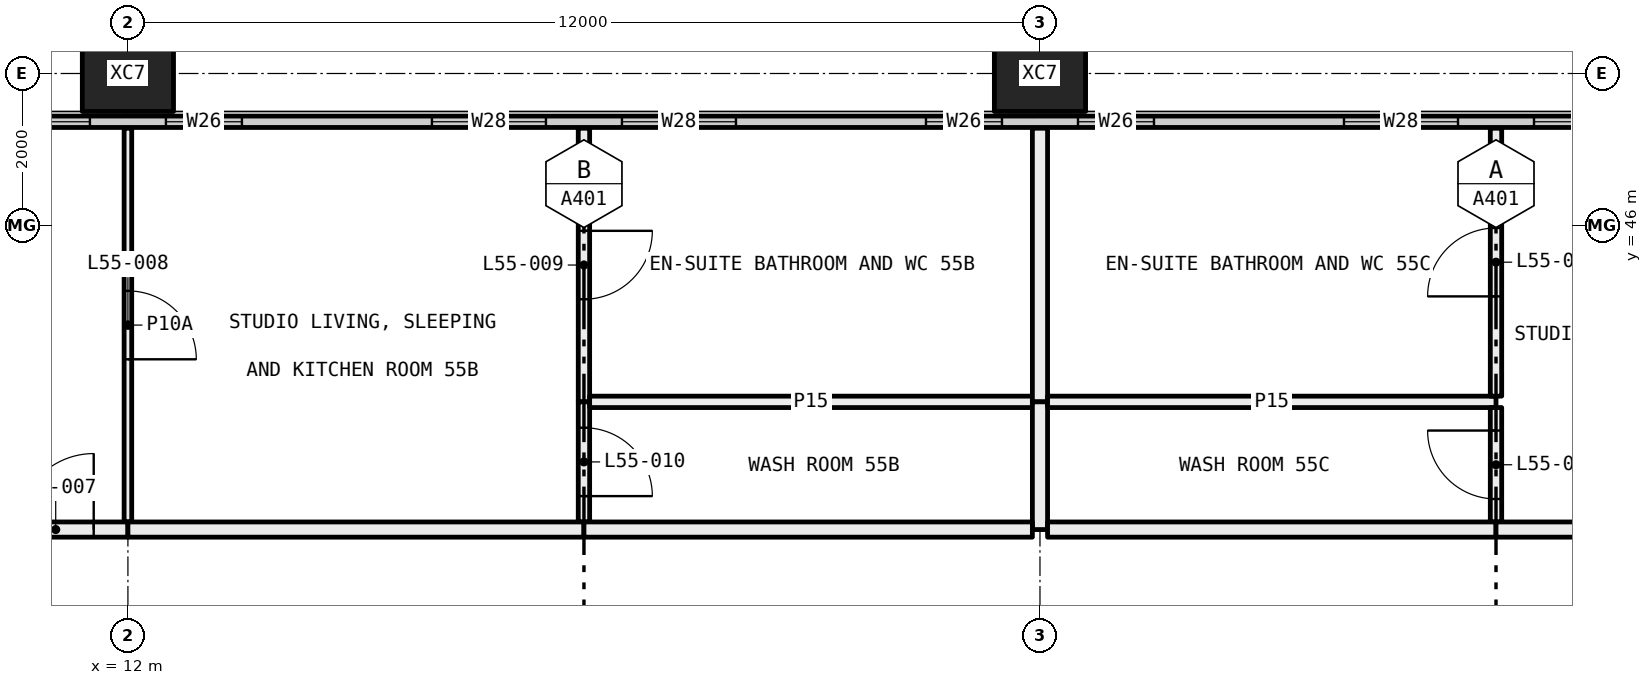
"""IFC4 building model, lengths in metres.
Left out: names, types, materials, properties, quantities, classifications, styles, units other than length and angle.
Written with IfcOpenShell. Run it as: python <this file> out.ifc"""

import sys

from ifc_helpers import new_model, si_unit, direction, frame, frame_2d, origin, origin_2d, place, context, subcontext, project, spatial, rectangle, hollow_rectangle, extrude, element, fill, save


model = new_model("IFC4")
c1 = context("Model", 3, precision=1e-05, world=origin(), true_north=direction((0.0, 1.0)))
c2 = subcontext(c1, "Body", "Model", "MODEL_VIEW")
j1 = project(units=[si_unit("LENGTHUNIT", "METRE"), si_unit("PLANEANGLEUNIT", "RADIAN")], contexts=[c1])
p1 = place(None, origin())
s1 = spatial("IfcSite", under=j1, at=p1, CompositionType="ELEMENT")
p2 = place(p1, origin())
s2 = spatial("IfcBuilding", under=s1, at=p2, CompositionType="ELEMENT")
p3 = place(p2, frame((0.0, 0.0, 206.55)))
s3 = spatial("IfcBuildingStorey", under=s2, at=p3, CompositionType="ELEMENT", Elevation=206.55)
for number, where, z_axis, x_axis in (
    (1, (12.0, 48.0, -0.4), (0.0, 0.0, 1.0), (1.0, 0.0, 0.0)),
    (2, (24.0, 48.0, -0.4), (0.0, 0.0, 1.0), (1.0, 0.0, 0.0)),
):
    element("IfcColumn", number, at=place(p3, frame(where, z_axis=z_axis, x_axis=x_axis)), inside=s3, PredefinedType="COLUMN", context=c2, shape_type="SweptSolid", body=[
        extrude(hollow_rectangle(XDim=1.2, YDim=1.0, WallThickness=0.045, at=origin_2d()), origin(), (0.0, 0.0, 1.0), 3.45),
    ])
p4 = place(p3, frame((6.56, 47.365, 0.0), z_axis=(0.0, 0.0, 1.0), x_axis=(1.0, 0.0, 0.0)))
e3 = element("IfcWall", 3, at=p4, inside=s3, PredefinedType="ELEMENTEDWALL", context=c2, shape_type="SweptSolid", body=[
    extrude(rectangle(XDim=46.88, YDim=0.15, at=frame_2d((23.44, 0.0))), origin(), (0.0, 0.0, 1.0), 3.05),
])
p5 = place(p4, frame((0.44, 0.0, 0.45)))
e4 = element("IfcOpeningElement", 4, at=p5, cuts=e3, PredefinedType="OPENING", context=c2, shape_type="SweptSolid", body=[
    extrude(rectangle(XDim=4.5, YDim=2.55, at=frame_2d((2.25, 1.275))), frame((0.0, 0.085, 0.0), z_axis=(0.0, -1.0, 0.0), x_axis=(1.0, 0.0, 0.0)), (0.0, 0.0, 1.0), 0.17),
])
p6 = place(p4, frame((5.94, 0.0, 0.45)))
e5 = element("IfcOpeningElement", 5, at=p6, cuts=e3, PredefinedType="OPENING", context=c2, shape_type="SweptSolid", body=[
    extrude(rectangle(XDim=1.0, YDim=2.55, at=frame_2d((0.5, 1.275))), frame((0.0, 0.085, 0.0), z_axis=(0.0, -1.0, 0.0), x_axis=(1.0, 0.0, 0.0)), (0.0, 0.0, 1.0), 0.17),
])
p7 = place(p4, frame((9.44, 0.0, 0.45)))
e6 = element("IfcOpeningElement", 6, at=p7, cuts=e3, PredefinedType="OPENING", context=c2, shape_type="SweptSolid", body=[
    extrude(rectangle(XDim=1.5, YDim=2.55, at=frame_2d((0.75, 1.275))), frame((0.0, 0.085, 0.0), z_axis=(0.0, -1.0, 0.0), x_axis=(1.0, 0.0, 0.0)), (0.0, 0.0, 1.0), 0.17),
])
p8 = place(p4, frame((11.94, 0.0, 0.45)))
e7 = element("IfcOpeningElement", 7, at=p8, cuts=e3, PredefinedType="OPENING", context=c2, shape_type="SweptSolid", body=[
    extrude(rectangle(XDim=1.5, YDim=2.55, at=frame_2d((0.75, 1.275))), frame((0.0, 0.085, 0.0), z_axis=(0.0, -1.0, 0.0), x_axis=(1.0, 0.0, 0.0)), (0.0, 0.0, 1.0), 0.17),
])
p9 = place(p4, frame((15.94, 0.0, 0.45)))
e8 = element("IfcOpeningElement", 8, at=p9, cuts=e3, PredefinedType="OPENING", context=c2, shape_type="SweptSolid", body=[
    extrude(rectangle(XDim=1.0, YDim=2.55, at=frame_2d((0.5, 1.275))), frame((0.0, 0.085, 0.0), z_axis=(0.0, -1.0, 0.0), x_axis=(1.0, 0.0, 0.0)), (0.0, 0.0, 1.0), 0.17),
])
p10 = place(p4, frame((17.94, 0.0, 0.45)))
e9 = element("IfcOpeningElement", 9, at=p10, cuts=e3, PredefinedType="OPENING", context=c2, shape_type="SweptSolid", body=[
    extrude(rectangle(XDim=1.0, YDim=2.55, at=frame_2d((0.5, 1.275))), frame((0.0, 0.085, 0.0), z_axis=(0.0, -1.0, 0.0), x_axis=(1.0, 0.0, 0.0)), (0.0, 0.0, 1.0), 0.17),
])
p11 = place(p4, frame((21.44, 0.0, 0.45)))
e10 = element("IfcOpeningElement", 10, at=p11, cuts=e3, PredefinedType="OPENING", context=c2, shape_type="SweptSolid", body=[
    extrude(rectangle(XDim=1.5, YDim=2.55, at=frame_2d((0.75, 1.275))), frame((0.0, 0.085, 0.0), z_axis=(0.0, -1.0, 0.0), x_axis=(1.0, 0.0, 0.0)), (0.0, 0.0, 1.0), 0.17),
])
p12 = place(p4, frame((23.94, 0.0, 0.45)))
e11 = element("IfcOpeningElement", 11, at=p12, cuts=e3, PredefinedType="OPENING", context=c2, shape_type="SweptSolid", body=[
    extrude(rectangle(XDim=1.5, YDim=2.55, at=frame_2d((0.75, 1.275))), frame((0.0, 0.085, 0.0), z_axis=(0.0, -1.0, 0.0), x_axis=(1.0, 0.0, 0.0)), (0.0, 0.0, 1.0), 0.17),
])
p13 = place(p4, frame((27.94, 0.0, 0.45)))
e12 = element("IfcOpeningElement", 12, at=p13, cuts=e3, PredefinedType="OPENING", context=c2, shape_type="SweptSolid", body=[
    extrude(rectangle(XDim=1.0, YDim=2.55, at=frame_2d((0.5, 1.275))), frame((0.0, 0.085, 0.0), z_axis=(0.0, -1.0, 0.0), x_axis=(1.0, 0.0, 0.0)), (0.0, 0.0, 1.0), 0.17),
])
p14 = place(p4, frame((29.94, 0.0, 0.45)))
e13 = element("IfcOpeningElement", 13, at=p14, cuts=e3, PredefinedType="OPENING", context=c2, shape_type="SweptSolid", body=[
    extrude(rectangle(XDim=1.0, YDim=2.55, at=frame_2d((0.5, 1.275))), frame((0.0, 0.085, 0.0), z_axis=(0.0, -1.0, 0.0), x_axis=(1.0, 0.0, 0.0)), (0.0, 0.0, 1.0), 0.17),
])
p15 = place(p4, frame((33.44, 0.0, 0.45)))
e14 = element("IfcOpeningElement", 14, at=p15, cuts=e3, PredefinedType="OPENING", context=c2, shape_type="SweptSolid", body=[
    extrude(rectangle(XDim=1.5, YDim=2.55, at=frame_2d((0.75, 1.275))), frame((0.0, 0.085, 0.0), z_axis=(0.0, -1.0, 0.0), x_axis=(1.0, 0.0, 0.0)), (0.0, 0.0, 1.0), 0.17),
])
p16 = place(p4, frame((35.94, 0.0, 0.45)))
e15 = element("IfcOpeningElement", 15, at=p16, cuts=e3, PredefinedType="OPENING", context=c2, shape_type="SweptSolid", body=[
    extrude(rectangle(XDim=1.5, YDim=2.55, at=frame_2d((0.75, 1.275))), frame((0.0, 0.085, 0.0), z_axis=(0.0, -1.0, 0.0), x_axis=(1.0, 0.0, 0.0)), (0.0, 0.0, 1.0), 0.17),
])
p17 = place(p4, frame((39.94, 0.0, 0.45)))
e16 = element("IfcOpeningElement", 16, at=p17, cuts=e3, PredefinedType="OPENING", context=c2, shape_type="SweptSolid", body=[
    extrude(rectangle(XDim=1.0, YDim=2.55, at=frame_2d((0.5, 1.275))), frame((0.0, 0.085, 0.0), z_axis=(0.0, -1.0, 0.0), x_axis=(1.0, 0.0, 0.0)), (0.0, 0.0, 1.0), 0.17),
])
p18 = place(p4, frame((41.94, 0.0, 0.45)))
e17 = element("IfcOpeningElement", 17, at=p18, cuts=e3, PredefinedType="OPENING", context=c2, shape_type="SweptSolid", body=[
    extrude(rectangle(XDim=4.5, YDim=2.55, at=frame_2d((2.25, 1.275))), frame((0.0, 0.085, 0.0), z_axis=(0.0, -1.0, 0.0), x_axis=(1.0, 0.0, 0.0)), (0.0, 0.0, 1.0), 0.17),
])
p19 = place(p3, frame((12.0, 42.1, 0.0), z_axis=(0.0, 0.0, 1.0), x_axis=(0.0, 1.0, 0.0)))
e18 = element("IfcWall", 18, at=p19, inside=s3, PredefinedType="PARTITIONING", context=c2, shape_type="SweptSolid", body=[
    extrude(rectangle(XDim=5.18, YDim=0.1, at=frame_2d((2.59, 0.0))), origin(), (0.0, 0.0, 1.0), 3.05),
])
p20 = place(p19, frame((2.14, 0.0, 0.0)))
e19 = element("IfcOpeningElement", 19, at=p20, cuts=e18, PredefinedType="OPENING", context=c2, shape_type="SweptSolid", body=[
    extrude(rectangle(XDim=0.9, YDim=2.1, at=frame_2d((0.45, 1.05))), frame((0.0, 0.06, 0.0), z_axis=(0.0, -1.0, 0.0), x_axis=(1.0, 0.0, 0.0)), (0.0, 0.0, 1.0), 0.12),
])
p21 = place(p3, frame((10.1, 42.0, 0.0), z_axis=(0.0, 0.0, 1.0), x_axis=(1.0, 0.0, 0.0)))
e20 = element("IfcWall", 20, at=p21, inside=s3, PredefinedType="PARTITIONING", context=c2, shape_type="SweptSolid", body=[
    extrude(rectangle(XDim=1.9, YDim=0.2, at=frame_2d((0.95, 0.0))), origin(), (0.0, 0.0, 1.0), 3.05),
])
p22 = place(p21, frame((0.45, 0.0, 0.0)))
e21 = element("IfcOpeningElement", 21, at=p22, cuts=e20, PredefinedType="OPENING", context=c2, shape_type="SweptSolid", body=[
    extrude(rectangle(XDim=1.0, YDim=2.1, at=frame_2d((0.5, 1.05))), frame((0.0, 0.11, 0.0), z_axis=(0.0, -1.0, 0.0), x_axis=(1.0, 0.0, 0.0)), (0.0, 0.0, 1.0), 0.22),
])
p23 = place(p3, frame((18.0, 43.68, 0.0), z_axis=(0.0, 0.0, 1.0), x_axis=(0.0, 1.0, 0.0)))
e22 = element("IfcWall", 22, at=p23, inside=s3, PredefinedType="PARTITIONING", context=c2, shape_type="SweptSolid", body=[
    extrude(rectangle(XDim=3.6, YDim=0.15, at=frame_2d((1.8, 0.0))), origin(), (0.0, 0.0, 1.0), 3.05),
])
p24 = place(p23, frame((1.35, 0.0, 0.0)))
e23 = element("IfcOpeningElement", 23, at=p24, cuts=e22, PredefinedType="OPENING", context=c2, shape_type="SweptSolid", body=[
    extrude(rectangle(XDim=0.9, YDim=2.1, at=frame_2d((0.45, 1.05))), frame((0.0, 0.085, 0.0), z_axis=(0.0, -1.0, 0.0), x_axis=(1.0, 0.0, 0.0)), (0.0, 0.0, 1.0), 0.17),
])
p25 = place(p3, frame((18.0, 42.1, 0.0), z_axis=(0.0, 0.0, 1.0), x_axis=(0.0, 1.0, 0.0)))
e24 = element("IfcWall", 24, at=p25, inside=s3, PredefinedType="PARTITIONING", context=c2, shape_type="SweptSolid", body=[
    extrude(rectangle(XDim=1.58, YDim=0.15, at=frame_2d((0.79, 0.0))), origin(), (0.0, 0.0, 1.0), 3.05),
])
p26 = place(p25, frame((0.34, 0.0, 0.0)))
e25 = element("IfcOpeningElement", 25, at=p26, cuts=e24, PredefinedType="OPENING", context=c2, shape_type="SweptSolid", body=[
    extrude(rectangle(XDim=0.9, YDim=2.1, at=frame_2d((0.45, 1.05))), frame((0.0, 0.085, 0.0), z_axis=(0.0, -1.0, 0.0), x_axis=(1.0, 0.0, 0.0)), (0.0, 0.0, 1.0), 0.17),
])
p27 = place(p3, frame((12.0, 42.0, 0.0), z_axis=(0.0, 0.0, 1.0), x_axis=(1.0, 0.0, 0.0)))
e26 = element("IfcWall", 26, at=p27, inside=s3, PredefinedType="PARTITIONING", context=c2, shape_type="SweptSolid", body=[
    extrude(rectangle(XDim=6.0, YDim=0.2, at=frame_2d((3.0, 0.0))), origin(), (0.0, 0.0, 1.0), 3.05),
])
p28 = place(p3, frame((18.075, 43.68, 0.0), z_axis=(0.0, 0.0, 1.0), x_axis=(1.0, 0.0, 0.0)))
e27 = element("IfcWall", 27, at=p28, inside=s3, PredefinedType="PARTITIONING", context=c2, shape_type="SweptSolid", body=[
    extrude(rectangle(XDim=5.825, YDim=0.15, at=frame_2d((2.913, 0.0))), origin(), (0.0, 0.0, 1.0), 3.05),
])
p29 = place(p3, frame((24.0, 43.68, 0.0), z_axis=(0.0, 0.0, 1.0), x_axis=(0.0, 1.0, 0.0)))
e28 = element("IfcWall", 28, at=p29, inside=s3, PredefinedType="PARTITIONING", context=c2, shape_type="SweptSolid", body=[
    extrude(rectangle(XDim=3.6, YDim=0.2, at=frame_2d((1.8, 0.0))), origin(), (0.0, 0.0, 1.0), 3.05),
])
p30 = place(p3, frame((24.0, 42.0, 0.0), z_axis=(0.0, 0.0, 1.0), x_axis=(0.0, 1.0, 0.0)))
e29 = element("IfcWall", 29, at=p30, inside=s3, PredefinedType="PARTITIONING", context=c2, shape_type="SweptSolid", body=[
    extrude(rectangle(XDim=1.68, YDim=0.2, at=frame_2d((0.84, 0.0))), origin(), (0.0, 0.0, 1.0), 3.05),
])
p31 = place(p3, frame((18.0, 42.0, 0.0), z_axis=(0.0, 0.0, 1.0), x_axis=(1.0, 0.0, 0.0)))
e30 = element("IfcWall", 30, at=p31, inside=s3, PredefinedType="PARTITIONING", context=c2, shape_type="SweptSolid", body=[
    extrude(rectangle(XDim=5.9, YDim=0.2, at=frame_2d((2.95, 0.0))), origin(), (0.0, 0.0, 1.0), 3.05),
])
p32 = place(p3, frame((24.1, 43.68, 0.0), z_axis=(0.0, 0.0, 1.0), x_axis=(1.0, 0.0, 0.0)))
e31 = element("IfcWall", 31, at=p32, inside=s3, PredefinedType="PARTITIONING", context=c2, shape_type="SweptSolid", body=[
    extrude(rectangle(XDim=5.9, YDim=0.15, at=frame_2d((2.95, 0.0))), origin(), (0.0, 0.0, 1.0), 3.05),
])
p33 = place(p3, frame((30.0, 43.755, 0.0), z_axis=(0.0, 0.0, 1.0), x_axis=(0.0, 1.0, 0.0)))
e32 = element("IfcWall", 32, at=p33, inside=s3, PredefinedType="PARTITIONING", context=c2, shape_type="SweptSolid", body=[
    extrude(rectangle(XDim=3.525, YDim=0.15, at=frame_2d((1.763, 0.0))), origin(), (0.0, 0.0, 1.0), 3.05),
])
p34 = place(p33, frame((1.312, 0.0, 0.0)))
e33 = element("IfcOpeningElement", 33, at=p34, cuts=e32, PredefinedType="OPENING", context=c2, shape_type="SweptSolid", body=[
    extrude(rectangle(XDim=0.9, YDim=2.1, at=frame_2d((0.45, 1.05))), frame((0.0, 0.085, 0.0), z_axis=(0.0, -1.0, 0.0), x_axis=(1.0, 0.0, 0.0)), (0.0, 0.0, 1.0), 0.17),
])
p35 = place(p3, frame((30.0, 42.1, 0.0), z_axis=(0.0, 0.0, 1.0), x_axis=(0.0, 1.0, 0.0)))
e34 = element("IfcWall", 34, at=p35, inside=s3, PredefinedType="PARTITIONING", context=c2, shape_type="SweptSolid", body=[
    extrude(rectangle(XDim=1.505, YDim=0.15, at=frame_2d((0.752, 0.0))), origin(), (0.0, 0.0, 1.0), 3.05),
])
p36 = place(p35, frame((0.302, 0.0, 0.0)))
e35 = element("IfcOpeningElement", 35, at=p36, cuts=e34, PredefinedType="OPENING", context=c2, shape_type="SweptSolid", body=[
    extrude(rectangle(XDim=0.9, YDim=2.1, at=frame_2d((0.45, 1.05))), frame((0.0, 0.085, 0.0), z_axis=(0.0, -1.0, 0.0), x_axis=(1.0, 0.0, 0.0)), (0.0, 0.0, 1.0), 0.17),
])
p37 = place(p3, frame((24.1, 42.0, 0.0), z_axis=(0.0, 0.0, 1.0), x_axis=(1.0, 0.0, 0.0)))
e36 = element("IfcWall", 36, at=p37, inside=s3, PredefinedType="PARTITIONING", context=c2, shape_type="SweptSolid", body=[
    extrude(rectangle(XDim=5.9, YDim=0.2, at=frame_2d((2.95, 0.0))), origin(), (0.0, 0.0, 1.0), 3.05),
])
p38 = place(p3, frame((30.0, 42.0, 0.0), z_axis=(0.0, 0.0, 1.0), x_axis=(1.0, 0.0, 0.0)))
e37 = element("IfcWall", 37, at=p38, inside=s3, PredefinedType="PARTITIONING", context=c2, shape_type="SweptSolid", body=[
    extrude(rectangle(XDim=6.0, YDim=0.2, at=frame_2d((3.0, 0.0))), origin(), (0.0, 0.0, 1.0), 2.45),
])
p39 = place(p5, origin())
e38 = element("IfcWindow", 38, at=p39, inside=s3, PartitioningType="SINGLE_PANEL", PredefinedType="WINDOW", context=c2, shape_type="SweptSolid", body=[
    extrude(rectangle(XDim=4.5, YDim=2.55, at=frame_2d((2.25, 1.275))), frame((0.0, 0.03, 0.0), z_axis=(0.0, -1.0, 0.0), x_axis=(1.0, 0.0, 0.0)), (0.0, 0.0, 1.0), 0.06),
])
fill(e4, e38)
p40 = place(p6, origin())
e39 = element("IfcWindow", 39, at=p40, inside=s3, PartitioningType="SINGLE_PANEL", PredefinedType="WINDOW", context=c2, shape_type="SweptSolid", body=[
    extrude(rectangle(XDim=1.0, YDim=2.55, at=frame_2d((0.5, 1.275))), frame((0.0, 0.03, 0.0), z_axis=(0.0, -1.0, 0.0), x_axis=(1.0, 0.0, 0.0)), (0.0, 0.0, 1.0), 0.06),
])
fill(e5, e39)
p41 = place(p7, origin())
e40 = element("IfcWindow", 40, at=p41, inside=s3, PartitioningType="SINGLE_PANEL", PredefinedType="WINDOW", context=c2, shape_type="SweptSolid", body=[
    extrude(rectangle(XDim=1.5, YDim=2.55, at=frame_2d((0.75, 1.275))), frame((0.0, 0.03, 0.0), z_axis=(0.0, -1.0, 0.0), x_axis=(1.0, 0.0, 0.0)), (0.0, 0.0, 1.0), 0.06),
])
fill(e6, e40)
p42 = place(p8, origin())
e41 = element("IfcWindow", 41, at=p42, inside=s3, PartitioningType="SINGLE_PANEL", PredefinedType="WINDOW", context=c2, shape_type="SweptSolid", body=[
    extrude(rectangle(XDim=1.5, YDim=2.55, at=frame_2d((0.75, 1.275))), frame((0.0, 0.03, 0.0), z_axis=(0.0, -1.0, 0.0), x_axis=(1.0, 0.0, 0.0)), (0.0, 0.0, 1.0), 0.06),
])
fill(e7, e41)
p43 = place(p9, origin())
e42 = element("IfcWindow", 42, at=p43, inside=s3, PartitioningType="SINGLE_PANEL", PredefinedType="WINDOW", context=c2, shape_type="SweptSolid", body=[
    extrude(rectangle(XDim=1.0, YDim=2.55, at=frame_2d((0.5, 1.275))), frame((0.0, 0.03, 0.0), z_axis=(0.0, -1.0, 0.0), x_axis=(1.0, 0.0, 0.0)), (0.0, 0.0, 1.0), 0.06),
])
fill(e8, e42)
p44 = place(p10, origin())
e43 = element("IfcWindow", 43, at=p44, inside=s3, PartitioningType="SINGLE_PANEL", PredefinedType="WINDOW", context=c2, shape_type="SweptSolid", body=[
    extrude(rectangle(XDim=1.0, YDim=2.55, at=frame_2d((0.5, 1.275))), frame((0.0, 0.03, 0.0), z_axis=(0.0, -1.0, 0.0), x_axis=(1.0, 0.0, 0.0)), (0.0, 0.0, 1.0), 0.06),
])
fill(e9, e43)
p45 = place(p11, origin())
e44 = element("IfcWindow", 44, at=p45, inside=s3, PartitioningType="SINGLE_PANEL", PredefinedType="WINDOW", context=c2, shape_type="SweptSolid", body=[
    extrude(rectangle(XDim=1.5, YDim=2.55, at=frame_2d((0.75, 1.275))), frame((0.0, 0.03, 0.0), z_axis=(0.0, -1.0, 0.0), x_axis=(1.0, 0.0, 0.0)), (0.0, 0.0, 1.0), 0.06),
])
fill(e10, e44)
p46 = place(p12, origin())
e45 = element("IfcWindow", 45, at=p46, inside=s3, PartitioningType="SINGLE_PANEL", PredefinedType="WINDOW", context=c2, shape_type="SweptSolid", body=[
    extrude(rectangle(XDim=1.5, YDim=2.55, at=frame_2d((0.75, 1.275))), frame((0.0, 0.03, 0.0), z_axis=(0.0, -1.0, 0.0), x_axis=(1.0, 0.0, 0.0)), (0.0, 0.0, 1.0), 0.06),
])
fill(e11, e45)
p47 = place(p22, origin())
e46 = element("IfcDoor", 46, at=p47, inside=s3, OperationType="SINGLE_SWING_LEFT", PredefinedType="DOOR", context=c2, shape_type="SweptSolid", body=[
    extrude(rectangle(XDim=1.0, YDim=2.1, at=frame_2d((0.5, 1.05))), frame((0.0, 0.025, 0.0), z_axis=(0.0, -1.0, 0.0), x_axis=(1.0, 0.0, 0.0)), (0.0, 0.0, 1.0), 0.05),
])
fill(e21, e46)
p48 = place(p20, frame((0.9, 0.0, 0.0), x_axis=(-1.0, 0.0, 0.0)))
e47 = element("IfcDoor", 47, at=p48, inside=s3, OperationType="SINGLE_SWING_LEFT", PredefinedType="DOOR", context=c2, shape_type="SweptSolid", body=[
    extrude(rectangle(XDim=0.9, YDim=2.1, at=frame_2d((0.45, 1.05))), frame((0.0, 0.025, 0.0), z_axis=(0.0, -1.0, 0.0), x_axis=(1.0, 0.0, 0.0)), (0.0, 0.0, 1.0), 0.05),
])
fill(e19, e47)
p49 = place(p24, frame((0.9, 0.0, 0.0), x_axis=(-1.0, 0.0, 0.0)))
e48 = element("IfcDoor", 48, at=p49, inside=s3, OperationType="SINGLE_SWING_RIGHT", PredefinedType="DOOR", context=c2, shape_type="SweptSolid", body=[
    extrude(rectangle(XDim=0.9, YDim=2.1, at=frame_2d((0.45, 1.05))), frame((0.0, 0.025, 0.0), z_axis=(0.0, -1.0, 0.0), x_axis=(1.0, 0.0, 0.0)), (0.0, 0.0, 1.0), 0.05),
])
fill(e23, e48)
p50 = place(p26, frame((0.9, 0.0, 0.0), x_axis=(-1.0, 0.0, 0.0)))
e49 = element("IfcDoor", 49, at=p50, inside=s3, OperationType="SINGLE_SWING_LEFT", PredefinedType="DOOR", context=c2, shape_type="SweptSolid", body=[
    extrude(rectangle(XDim=0.9, YDim=2.1, at=frame_2d((0.45, 1.05))), frame((0.0, 0.025, 0.0), z_axis=(0.0, -1.0, 0.0), x_axis=(1.0, 0.0, 0.0)), (0.0, 0.0, 1.0), 0.05),
])
fill(e25, e49)
p51 = place(p34, origin())
e50 = element("IfcDoor", 50, at=p51, inside=s3, OperationType="SINGLE_SWING_RIGHT", PredefinedType="DOOR", context=c2, shape_type="SweptSolid", body=[
    extrude(rectangle(XDim=0.9, YDim=2.1, at=frame_2d((0.45, 1.05))), frame((0.0, 0.025, 0.0), z_axis=(0.0, -1.0, 0.0), x_axis=(1.0, 0.0, 0.0)), (0.0, 0.0, 1.0), 0.05),
])
fill(e33, e50)
p52 = place(p36, origin())
e51 = element("IfcDoor", 51, at=p52, inside=s3, OperationType="SINGLE_SWING_LEFT", PredefinedType="DOOR", context=c2, shape_type="SweptSolid", body=[
    extrude(rectangle(XDim=0.9, YDim=2.1, at=frame_2d((0.45, 1.05))), frame((0.0, 0.025, 0.0), z_axis=(0.0, -1.0, 0.0), x_axis=(1.0, 0.0, 0.0)), (0.0, 0.0, 1.0), 0.05),
])
fill(e35, e51)
save(model, sys.argv[1])
